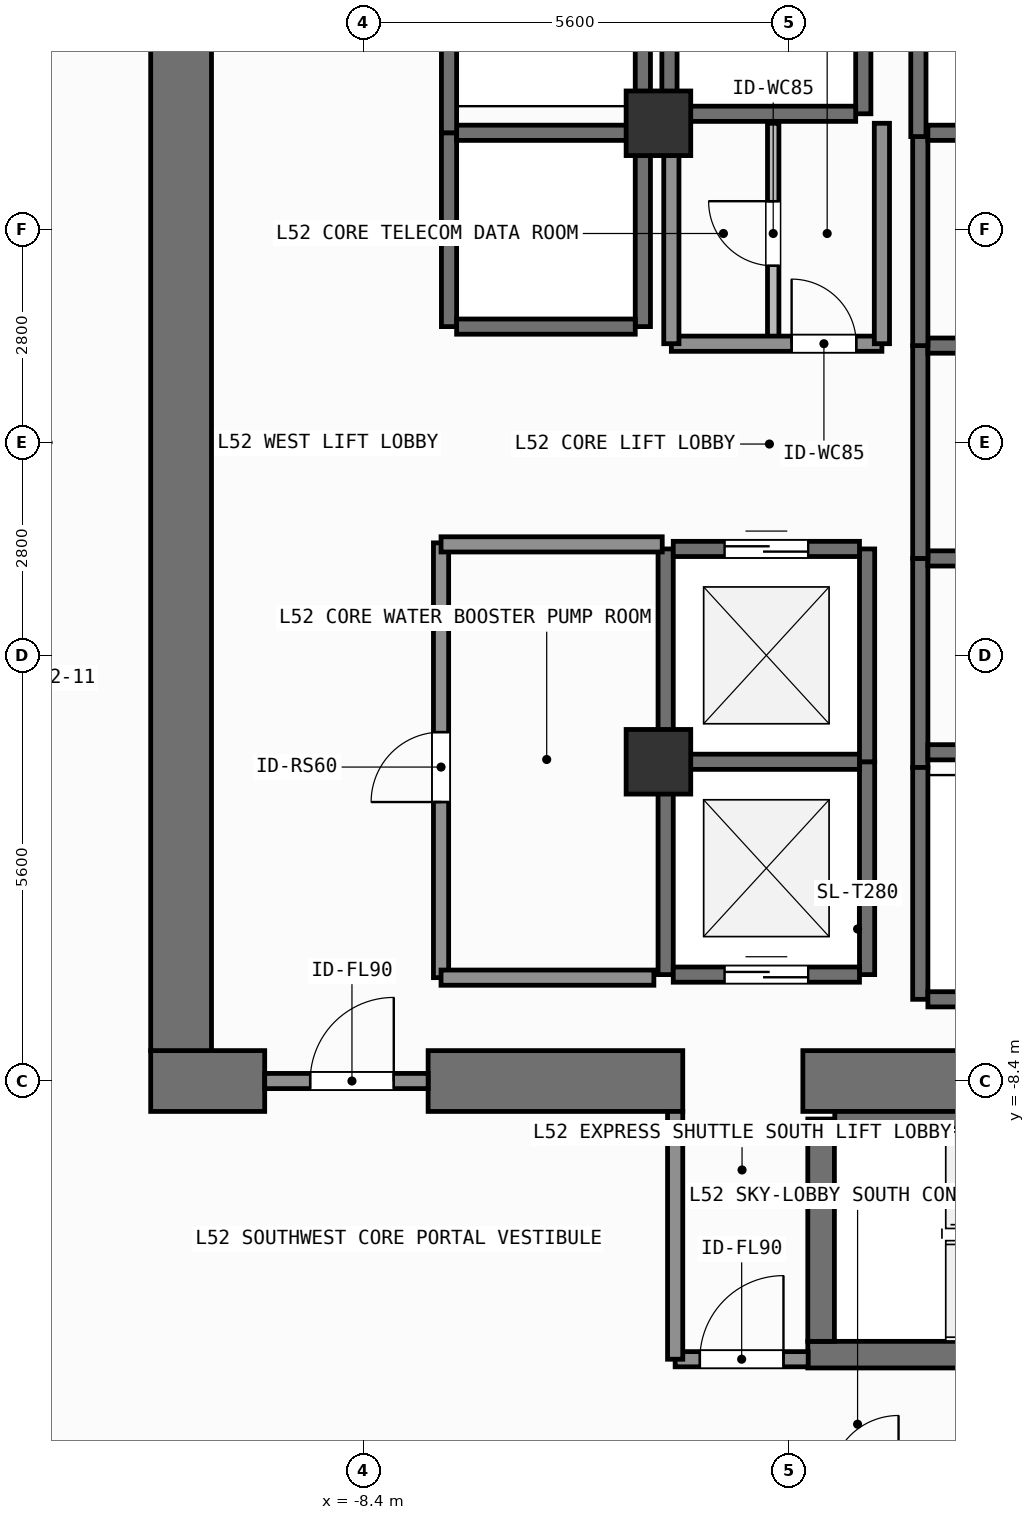
"""IFC4 building model, lengths in metres.
Left out: names, types, materials, properties, quantities, classifications, styles, units other than length and angle.
Written with IfcOpenShell. Run it as: python <this file> out.ifc"""

import sys

from ifc_helpers import new_model, si_unit, direction, frame, frame_2d, origin, origin_2d, place, context, subcontext, project, spatial, rectangle, extrude, element, fill, save


model = new_model("IFC4")
c1 = context("Model", 3, precision=1e-05, world=origin(), true_north=direction((0.0, 1.0)))
c2 = subcontext(c1, "Body", "Model", "MODEL_VIEW")
j1 = project(units=[si_unit("LENGTHUNIT", "METRE"), si_unit("PLANEANGLEUNIT", "RADIAN")], contexts=[c1])
p1 = place(None, origin())
s1 = spatial("IfcSite", under=j1, at=p1, CompositionType="ELEMENT")
p2 = place(p1, origin())
s2 = spatial("IfcBuilding", under=s1, at=p2, CompositionType="ELEMENT")
p3 = place(p2, frame((0.0, 0.0, 210.9)))
s3 = spatial("IfcBuildingStorey", under=s2, at=p3, CompositionType="ELEMENT", Elevation=210.9)
p4 = place(p3, frame((-11.2, -8.4, 0.0), z_axis=(0.0, 0.0, 1.0), x_axis=(1.0, 0.0, 0.0)))
e1 = element("IfcWall", 1, at=p4, inside=s3, PredefinedType="SHEAR", context=c2, shape_type="SweptSolid", body=[
    extrude(rectangle(XDim=1.5, YDim=0.8, at=frame_2d((0.75, 0.0))), origin(), (0.0, 0.0, 1.0), 4.8),
])
p5 = place(p3, frame((-7.55, -8.4, 0.0), z_axis=(0.0, 0.0, 1.0), x_axis=(1.0, 0.0, 0.0)))
e2 = element("IfcWall", 2, at=p5, inside=s3, PredefinedType="SHEAR", context=c2, shape_type="SweptSolid", body=[
    extrude(rectangle(XDim=3.35, YDim=0.8, at=frame_2d((1.675, 0.0))), origin(), (0.0, 0.0, 1.0), 4.8),
])
p6 = place(p3, frame((-2.62, -8.4, 0.0), z_axis=(0.0, 0.0, 1.0), x_axis=(1.0, 0.0, 0.0)))
e3 = element("IfcWall", 3, at=p6, inside=s3, PredefinedType="SHEAR", context=c2, shape_type="SweptSolid", body=[
    extrude(rectangle(XDim=7.27, YDim=0.8, at=frame_2d((3.635, 0.0))), origin(), (0.0, 0.0, 1.0), 4.8),
])
p7 = place(p3, frame((-10.8, -8.0, 0.0), z_axis=(0.0, 0.0, 1.0), x_axis=(0.0, 1.0, 0.0)))
e4 = element("IfcWall", 4, at=p7, inside=s3, PredefinedType="SHEAR", context=c2, shape_type="SweptSolid", body=[
    extrude(rectangle(XDim=16.0, YDim=0.8, at=frame_2d((8.0, 0.0))), origin(), (0.0, 0.0, 1.0), 4.8),
])
p8 = place(p3, frame((-2.555, -12.0, 0.0), z_axis=(0.0, 0.0, 1.0), x_axis=(1.0, 0.0, 0.0)))
e5 = element("IfcWall", 5, at=p8, inside=s3, PredefinedType="SHEAR", context=c2, shape_type="SweptSolid", body=[
    extrude(rectangle(XDim=7.31, YDim=0.35, at=frame_2d((3.655, 0.0))), origin(), (0.0, 0.0, 1.0), 4.8),
])
p9 = place(p3, frame((-2.2, -8.913, 0.0), z_axis=(0.0, 0.0, 1.0), x_axis=(1.0, 0.0, 0.0)))
e6 = element("IfcWall", 6, at=p9, inside=s3, PredefinedType="SHEAR", context=c2, shape_type="SweptSolid", body=[
    extrude(rectangle(XDim=6.6, YDim=0.225, at=frame_2d((3.3, 0.0))), origin(), (0.0, 0.0, 1.0), 4.8),
])
p10 = place(p3, frame((-2.38, -11.825, 0.0), z_axis=(0.0, 0.0, 1.0), x_axis=(0.0, 1.0, 0.0)))
e7 = element("IfcWall", 7, at=p10, inside=s3, PredefinedType="SHEAR", context=c2, shape_type="SweptSolid", body=[
    extrude(rectangle(XDim=2.925, YDim=0.35, at=frame_2d((1.462, 0.0))), origin(), (0.0, 0.0, 1.0), 4.8),
])
for number, where, z_axis, x_axis in (
    (8, (-4.52, -4.2, 0.0), (0.0, 0.0, 1.0), (1.0, 0.0, 0.0)),
    (9, (-4.52, 4.2, 0.0), (0.0, 0.0, 1.0), (1.0, 0.0, 0.0)),
):
    element("IfcColumn", number, at=place(p3, frame(where, z_axis=z_axis, x_axis=x_axis)), inside=s3, PredefinedType="COLUMN", context=c2, shape_type="SweptSolid", body=[
        extrude(rectangle(XDim=0.85, YDim=0.85, at=origin_2d()), origin(), (0.0, 0.0, 1.0), 4.8),
    ])
for number, where, z_axis, x_axis in (
    (10, (-7.275, 1.525, 0.0), (0.0, 0.0, 1.0), (0.0, 1.0, 0.0)),
    (11, (-4.725, 1.525, 0.0), (0.0, 0.0, 1.0), (0.0, 1.0, 0.0)),
):
    element("IfcWall", number, at=place(p3, frame(where, z_axis=z_axis, x_axis=x_axis)), inside=s3, PredefinedType="SHEAR", context=c2, shape_type="SweptSolid", body=[
        extrude(rectangle(XDim=2.55, YDim=0.2, at=frame_2d((1.275, 0.0))), origin(), (0.0, 0.0, 1.0), 4.58),
    ])
for number, where, z_axis, x_axis in (
    (12, (-7.175, 1.525, 0.0), (0.0, 0.0, 1.0), (1.0, 0.0, 0.0)),
    (13, (-7.175, 4.075, 0.0), (0.0, 0.0, 1.0), (1.0, 0.0, 0.0)),
):
    element("IfcWall", number, at=place(p3, frame(where, z_axis=z_axis, x_axis=x_axis)), inside=s3, PredefinedType="SHEAR", context=c2, shape_type="SweptSolid", body=[
        extrude(rectangle(XDim=2.35, YDim=0.2, at=frame_2d((1.175, 0.0))), origin(), (0.0, 0.0, 1.0), 4.58),
    ])
for number, where, z_axis, x_axis in (
    (14, (-7.275, 4.075, 0.0), (0.0, 0.0, 1.0), (0.0, 1.0, 0.0)),
    (15, (-4.725, 4.075, 0.0), (0.0, 0.0, 1.0), (0.0, 1.0, 0.0)),
):
    element("IfcWall", number, at=place(p3, frame(where, z_axis=z_axis, x_axis=x_axis)), inside=s3, PredefinedType="SHEAR", context=c2, shape_type="SweptSolid", body=[
        extrude(rectangle(XDim=2.8, YDim=0.2, at=frame_2d((1.4, 0.0))), origin(), (0.0, 0.0, 1.0), 4.58),
    ])
for number, where, z_axis, x_axis in (
    (16, (-4.375, 4.325, 0.0), (0.0, 0.0, 1.0), (0.0, 1.0, 0.0)),
    (17, (-1.825, 4.325, 0.0), (0.0, 0.0, 1.0), (0.0, 1.0, 0.0)),
):
    element("IfcWall", number, at=place(p3, frame(where, z_axis=z_axis, x_axis=x_axis)), inside=s3, PredefinedType="SHEAR", context=c2, shape_type="SweptSolid", body=[
        extrude(rectangle(XDim=2.55, YDim=0.2, at=frame_2d((1.275, 0.0))), origin(), (0.0, 0.0, 1.0), 4.58),
    ])
p11 = place(p3, frame((-4.275, 4.325, 0.0), z_axis=(0.0, 0.0, 1.0), x_axis=(1.0, 0.0, 0.0)))
e18 = element("IfcWall", 18, at=p11, inside=s3, PredefinedType="SHEAR", context=c2, shape_type="SweptSolid", body=[
    extrude(rectangle(XDim=2.35, YDim=0.2, at=frame_2d((1.175, 0.0))), origin(), (0.0, 0.0, 1.0), 4.58),
])
for number, where, z_axis, x_axis in (
    (19, (-4.425, -7.0, 0.0), (0.0, 0.0, 1.0), (0.0, 1.0, 0.0)),
    (20, (-1.775, -7.0, 0.0), (0.0, 0.0, 1.0), (0.0, 1.0, 0.0)),
):
    element("IfcWall", number, at=place(p3, frame(where, z_axis=z_axis, x_axis=x_axis)), inside=s3, PredefinedType="SHEAR", context=c2, shape_type="SweptSolid", body=[
        extrude(rectangle(XDim=2.8, YDim=0.2, at=frame_2d((1.4, 0.0))), origin(), (0.0, 0.0, 1.0), 4.58),
    ])
p12 = place(p3, frame((-4.325, -7.0, 0.0), z_axis=(0.0, 0.0, 1.0), x_axis=(1.0, 0.0, 0.0)))
e21 = element("IfcWall", 21, at=p12, inside=s3, PredefinedType="SHEAR", context=c2, shape_type="SweptSolid", body=[
    extrude(rectangle(XDim=2.45, YDim=0.2, at=frame_2d((1.225, 0.0))), origin(), (0.0, 0.0, 1.0), 4.58),
])
p13 = place(p12, frame((0.675, 0.0, 0.0)))
e22 = element("IfcOpeningElement", 22, at=p13, cuts=e21, PredefinedType="OPENING", context=c2, shape_type="SweptSolid", body=[
    extrude(rectangle(XDim=1.1, YDim=2.2, at=frame_2d((0.55, 1.1))), frame((0.0, 0.11, 0.0), z_axis=(0.0, -1.0, 0.0), x_axis=(1.0, 0.0, 0.0)), (0.0, 0.0, 1.0), 0.22),
])
p14 = place(p3, frame((-4.325, -4.2, 0.0), z_axis=(0.0, 0.0, 1.0), x_axis=(1.0, 0.0, 0.0)))
e23 = element("IfcWall", 23, at=p14, inside=s3, PredefinedType="SHEAR", context=c2, shape_type="SweptSolid", body=[
    extrude(rectangle(XDim=2.45, YDim=0.2, at=frame_2d((1.225, 0.0))), origin(), (0.0, 0.0, 1.0), 4.58),
])
for number, where, z_axis, x_axis in (
    (24, (-4.425, -4.2, 0.0), (0.0, 0.0, 1.0), (0.0, 1.0, 0.0)),
    (25, (-1.775, -4.2, 0.0), (0.0, 0.0, 1.0), (0.0, 1.0, 0.0)),
):
    element("IfcWall", number, at=place(p3, frame(where, z_axis=z_axis, x_axis=x_axis)), inside=s3, PredefinedType="SHEAR", context=c2, shape_type="SweptSolid", body=[
        extrude(rectangle(XDim=2.8, YDim=0.2, at=frame_2d((1.4, 0.0))), origin(), (0.0, 0.0, 1.0), 4.58),
    ])
p15 = place(p3, frame((-4.325, -1.4, 0.0), z_axis=(0.0, 0.0, 1.0), x_axis=(1.0, 0.0, 0.0)))
e26 = element("IfcWall", 26, at=p15, inside=s3, PredefinedType="SHEAR", context=c2, shape_type="SweptSolid", body=[
    extrude(rectangle(XDim=2.45, YDim=0.2, at=frame_2d((1.225, 0.0))), origin(), (0.0, 0.0, 1.0), 4.58),
])
p16 = place(p15, frame((0.675, 0.0, 0.0)))
e27 = element("IfcOpeningElement", 27, at=p16, cuts=e26, PredefinedType="OPENING", context=c2, shape_type="SweptSolid", body=[
    extrude(rectangle(XDim=1.1, YDim=2.2, at=frame_2d((0.55, 1.1))), frame((0.0, 0.11, 0.0), z_axis=(0.0, -1.0, 0.0), x_axis=(1.0, 0.0, 0.0)), (0.0, 0.0, 1.0), 0.22),
])
p17 = place(p3, frame((-1.075, -4.275, 0.0), z_axis=(0.0, 0.0, 1.0), x_axis=(0.0, 1.0, 0.0)))
e28 = element("IfcWall", 28, at=p17, inside=s3, PredefinedType="SHEAR", context=c2, shape_type="SweptSolid", body=[
    extrude(rectangle(XDim=2.75, YDim=0.2, at=frame_2d((1.375, 0.0))), origin(), (0.0, 0.0, 1.0), 4.58),
])
for number, where, z_axis, x_axis in (
    (29, (-0.975, -4.075, 0.0), (0.0, 0.0, 1.0), (1.0, 0.0, 0.0)),
    (30, (-0.975, -1.525, 0.0), (0.0, 0.0, 1.0), (1.0, 0.0, 0.0)),
):
    element("IfcWall", number, at=place(p3, frame(where, z_axis=z_axis, x_axis=x_axis)), inside=s3, PredefinedType="SHEAR", context=c2, shape_type="SweptSolid", body=[
        extrude(rectangle(XDim=2.35, YDim=0.2, at=frame_2d((1.175, 0.0))), origin(), (0.0, 0.0, 1.0), 4.58),
    ])
p18 = place(p3, frame((-1.075, -1.525, 0.0), z_axis=(0.0, 0.0, 1.0), x_axis=(0.0, 1.0, 0.0)))
e31 = element("IfcWall", 31, at=p18, inside=s3, PredefinedType="SHEAR", context=c2, shape_type="SweptSolid", body=[
    extrude(rectangle(XDim=2.8, YDim=0.2, at=frame_2d((1.4, 0.0))), origin(), (0.0, 0.0, 1.0), 4.58),
])
p19 = place(p3, frame((-0.975, 1.275, 0.0), z_axis=(0.0, 0.0, 1.0), x_axis=(1.0, 0.0, 0.0)))
e32 = element("IfcWall", 32, at=p19, inside=s3, PredefinedType="SHEAR", context=c2, shape_type="SweptSolid", body=[
    extrude(rectangle(XDim=2.35, YDim=0.2, at=frame_2d((1.175, 0.0))), origin(), (0.0, 0.0, 1.0), 4.58),
])
p20 = place(p3, frame((-1.075, 1.275, 0.0), z_axis=(0.0, 0.0, 1.0), x_axis=(0.0, 1.0, 0.0)))
e33 = element("IfcWall", 33, at=p20, inside=s3, PredefinedType="SHEAR", context=c2, shape_type="SweptSolid", body=[
    extrude(rectangle(XDim=2.8, YDim=0.2, at=frame_2d((1.4, 0.0))), origin(), (0.0, 0.0, 1.0), 4.58),
])
p21 = place(p3, frame((-0.975, 4.075, 0.0), z_axis=(0.0, 0.0, 1.0), x_axis=(1.0, 0.0, 0.0)))
e34 = element("IfcWall", 34, at=p21, inside=s3, PredefinedType="SHEAR", context=c2, shape_type="SweptSolid", body=[
    extrude(rectangle(XDim=2.35, YDim=0.2, at=frame_2d((1.175, 0.0))), origin(), (0.0, 0.0, 1.0), 4.58),
])
p22 = place(p3, frame((-1.1, 4.025, 0.0), z_axis=(0.0, 0.0, 1.0), x_axis=(0.0, 1.0, 0.0)))
e35 = element("IfcWall", 35, at=p22, inside=s3, PredefinedType="SHEAR", context=c2, shape_type="SweptSolid", body=[
    extrude(rectangle(XDim=3.15, YDim=0.2, at=frame_2d((1.575, 0.0))), origin(), (0.0, 0.0, 1.0), 4.58),
])
p23 = place(p3, frame((-1.075, -7.325, 0.0), z_axis=(0.0, 0.0, 1.0), x_axis=(0.0, 1.0, 0.0)))
e36 = element("IfcWall", 36, at=p23, inside=s3, PredefinedType="SHEAR", context=c2, shape_type="SweptSolid", body=[
    extrude(rectangle(XDim=3.05, YDim=0.2, at=frame_2d((1.525, 0.0))), origin(), (0.0, 0.0, 1.0), 4.58),
])
p24 = place(p3, frame((-0.975, -7.325, 0.0), z_axis=(0.0, 0.0, 1.0), x_axis=(1.0, 0.0, 0.0)))
e37 = element("IfcWall", 37, at=p24, inside=s3, PredefinedType="SHEAR", context=c2, shape_type="SweptSolid", body=[
    extrude(rectangle(XDim=2.35, YDim=0.2, at=frame_2d((1.175, 0.0))), origin(), (0.0, 0.0, 1.0), 4.58),
])
p25 = place(p3, frame((-9.7, -8.4, 0.0), z_axis=(0.0, 0.0, 1.0), x_axis=(1.0, 0.0, 0.0)))
e38 = element("IfcWall", 38, at=p25, inside=s3, PredefinedType="SOLIDWALL", context=c2, shape_type="SweptSolid", body=[
    extrude(rectangle(XDim=2.15, YDim=0.2, at=frame_2d((1.075, 0.0))), origin(), (0.0, 0.0, 1.0), 3.72),
])
p26 = place(p25, frame((0.598, 0.0, 0.0)))
e39 = element("IfcOpeningElement", 39, at=p26, cuts=e38, PredefinedType="OPENING", context=c2, shape_type="SweptSolid", body=[
    extrude(rectangle(XDim=1.1, YDim=2.15, at=frame_2d((0.55, 1.075))), frame((0.0, 0.11, 0.0), z_axis=(0.0, -1.0, 0.0), x_axis=(1.0, 0.0, 0.0)), (0.0, 0.0, 1.0), 0.22),
])
p27 = place(p3, frame((-4.3, -12.06, 0.0), z_axis=(0.0, 0.0, 1.0), x_axis=(1.0, 0.0, 0.0)))
e40 = element("IfcWall", 40, at=p27, inside=s3, PredefinedType="SOLIDWALL", context=c2, shape_type="SweptSolid", body=[
    extrude(rectangle(XDim=1.75, YDim=0.2, at=frame_2d((0.875, 0.0))), origin(), (0.0, 0.0, 1.0), 4.58),
])
p28 = place(p27, frame((0.325, 0.0, 0.0)))
e41 = element("IfcOpeningElement", 41, at=p28, cuts=e40, PredefinedType="OPENING", context=c2, shape_type="SweptSolid", body=[
    extrude(rectangle(XDim=1.1, YDim=2.15, at=frame_2d((0.55, 1.075))), frame((0.0, 0.11, 0.0), z_axis=(0.0, -1.0, 0.0), x_axis=(1.0, 0.0, 0.0)), (0.0, 0.0, 1.0), 0.22),
])
p29 = place(p3, frame((-7.38, -7.04, 0.0), z_axis=(0.0, 0.0, 1.0), x_axis=(0.0, 1.0, 0.0)))
e42 = element("IfcWall", 42, at=p29, inside=s3, PredefinedType="SOLIDWALL", context=c2, shape_type="SweptSolid", body=[
    extrude(rectangle(XDim=5.72, YDim=0.2, at=frame_2d((2.86, 0.0))), origin(), (0.0, 0.0, 1.0), 4.58),
])
p30 = place(p29, frame((2.31, 0.0, 0.0)))
e43 = element("IfcOpeningElement", 43, at=p30, cuts=e42, PredefinedType="OPENING", context=c2, shape_type="SweptSolid", body=[
    extrude(rectangle(XDim=0.92, YDim=2.1, at=frame_2d((0.46, 1.05))), frame((0.0, 0.11, 0.0), z_axis=(0.0, -1.0, 0.0), x_axis=(1.0, 0.0, 0.0)), (0.0, 0.0, 1.0), 0.22),
])
p31 = place(p3, frame((-3.01, 1.3, 0.0), z_axis=(0.0, 0.0, 1.0), x_axis=(0.0, 1.0, 0.0)))
e44 = element("IfcWall", 44, at=p31, inside=s3, PredefinedType="PARTITIONING", context=c2, shape_type="SweptSolid", body=[
    extrude(rectangle(XDim=2.9, YDim=0.15, at=frame_2d((1.45, 0.0))), origin(), (0.0, 0.0, 1.0), 4.58),
])
p32 = place(p31, frame((1.025, 0.0, 0.0)))
e45 = element("IfcOpeningElement", 45, at=p32, cuts=e44, PredefinedType="OPENING", context=c2, shape_type="SweptSolid", body=[
    extrude(rectangle(XDim=0.85, YDim=2.1, at=frame_2d((0.425, 1.05))), frame((0.0, 0.085, 0.0), z_axis=(0.0, -1.0, 0.0), x_axis=(1.0, 0.0, 0.0)), (0.0, 0.0, 1.0), 0.17),
])
p33 = place(p3, frame((-4.35, 1.3, 0.0), z_axis=(0.0, 0.0, 1.0), x_axis=(1.0, 0.0, 0.0)))
e46 = element("IfcWall", 46, at=p33, inside=s3, PredefinedType="SOLIDWALL", context=c2, shape_type="SweptSolid", body=[
    extrude(rectangle(XDim=2.77, YDim=0.2, at=frame_2d((1.385, 0.0))), origin(), (0.0, 0.0, 1.0), 4.58),
])
p34 = place(p33, frame((1.582, 0.0, 0.0)))
e47 = element("IfcOpeningElement", 47, at=p34, cuts=e46, PredefinedType="OPENING", context=c2, shape_type="SweptSolid", body=[
    extrude(rectangle(XDim=0.85, YDim=2.1, at=frame_2d((0.425, 1.05))), frame((0.0, 0.11, 0.0), z_axis=(0.0, -1.0, 0.0), x_axis=(1.0, 0.0, 0.0)), (0.0, 0.0, 1.0), 0.22),
])
p35 = place(p3, frame((-4.3, -12.06, 0.0), z_axis=(0.0, 0.0, 1.0), x_axis=(0.0, 1.0, 0.0)))
e48 = element("IfcWall", 48, at=p35, inside=s3, PredefinedType="SOLIDWALL", context=c2, shape_type="SweptSolid", body=[
    extrude(rectangle(XDim=3.26, YDim=0.2, at=frame_2d((1.63, 0.0))), origin(), (0.0, 0.0, 1.0), 4.58),
])
p36 = place(p3, frame((-7.38, -1.34, 0.0), z_axis=(0.0, 0.0, 1.0), x_axis=(1.0, 0.0, 0.0)))
e49 = element("IfcWall", 49, at=p36, inside=s3, PredefinedType="SOLIDWALL", context=c2, shape_type="SweptSolid", body=[
    extrude(rectangle(XDim=2.91, YDim=0.2, at=frame_2d((1.455, 0.0))), origin(), (0.0, 0.0, 1.0), 4.58),
])
p37 = place(p3, frame((-7.38, -7.04, 0.0), z_axis=(0.0, 0.0, 1.0), x_axis=(1.0, 0.0, 0.0)))
e50 = element("IfcWall", 50, at=p37, inside=s3, PredefinedType="SOLIDWALL", context=c2, shape_type="SweptSolid", body=[
    extrude(rectangle(XDim=2.8, YDim=0.2, at=frame_2d((1.4, 0.0))), origin(), (0.0, 0.0, 1.0), 4.58),
])
for number, where, z_axis, x_axis in (
    (51, (-4.35, 1.3, 0.0), (0.0, 0.0, 1.0), (0.0, 1.0, 0.0)),
    (52, (-1.58, 1.3, 0.0), (0.0, 0.0, 1.0), (0.0, 1.0, 0.0)),
):
    element("IfcWall", number, at=place(p3, frame(where, z_axis=z_axis, x_axis=x_axis)), inside=s3, PredefinedType="SOLIDWALL", context=c2, shape_type="SweptSolid", body=[
        extrude(rectangle(XDim=2.9, YDim=0.2, at=frame_2d((1.45, 0.0))), origin(), (0.0, 0.0, 1.0), 4.58),
    ])
p38 = place(p13, origin())
e53 = element("IfcDoor", 53, at=p38, inside=s3, OperationType="SLIDING_TO_LEFT", PredefinedType="DOOR", context=c2, shape_type="SweptSolid", body=[
    extrude(rectangle(XDim=1.1, YDim=2.2, at=frame_2d((0.55, 1.1))), frame((0.0, 0.025, 0.0), z_axis=(0.0, -1.0, 0.0), x_axis=(1.0, 0.0, 0.0)), (0.0, 0.0, 1.0), 0.05),
])
fill(e22, e53)
p39 = place(p16, origin())
e54 = element("IfcDoor", 54, at=p39, inside=s3, OperationType="SLIDING_TO_LEFT", PredefinedType="DOOR", context=c2, shape_type="SweptSolid", body=[
    extrude(rectangle(XDim=1.1, YDim=2.2, at=frame_2d((0.55, 1.1))), frame((0.0, 0.025, 0.0), z_axis=(0.0, -1.0, 0.0), x_axis=(1.0, 0.0, 0.0)), (0.0, 0.0, 1.0), 0.05),
])
fill(e27, e54)
p40 = place(p26, origin())
e55 = element("IfcDoor", 55, at=p40, inside=s3, OperationType="SINGLE_SWING_RIGHT", PredefinedType="DOOR", context=c2, shape_type="SweptSolid", body=[
    extrude(rectangle(XDim=1.1, YDim=2.15, at=frame_2d((0.55, 1.075))), frame((0.0, 0.025, 0.0), z_axis=(0.0, -1.0, 0.0), x_axis=(1.0, 0.0, 0.0)), (0.0, 0.0, 1.0), 0.05),
])
fill(e39, e55)
p41 = place(p28, origin())
e56 = element("IfcDoor", 56, at=p41, inside=s3, OperationType="SINGLE_SWING_RIGHT", PredefinedType="DOOR", context=c2, shape_type="SweptSolid", body=[
    extrude(rectangle(XDim=1.1, YDim=2.15, at=frame_2d((0.55, 1.075))), frame((0.0, 0.025, 0.0), z_axis=(0.0, -1.0, 0.0), x_axis=(1.0, 0.0, 0.0)), (0.0, 0.0, 1.0), 0.05),
])
fill(e41, e56)
p42 = place(p30, origin())
e57 = element("IfcDoor", 57, at=p42, inside=s3, OperationType="SINGLE_SWING_LEFT", PredefinedType="DOOR", context=c2, shape_type="SweptSolid", body=[
    extrude(rectangle(XDim=0.92, YDim=2.1, at=frame_2d((0.46, 1.05))), frame((0.0, 0.025, 0.0), z_axis=(0.0, -1.0, 0.0), x_axis=(1.0, 0.0, 0.0)), (0.0, 0.0, 1.0), 0.05),
])
fill(e43, e57)
p43 = place(p32, origin())
e58 = element("IfcDoor", 58, at=p43, inside=s3, OperationType="SINGLE_SWING_RIGHT", PredefinedType="DOOR", context=c2, shape_type="SweptSolid", body=[
    extrude(rectangle(XDim=0.85, YDim=2.1, at=frame_2d((0.425, 1.05))), frame((0.0, 0.025, 0.0), z_axis=(0.0, -1.0, 0.0), x_axis=(1.0, 0.0, 0.0)), (0.0, 0.0, 1.0), 0.05),
])
fill(e45, e58)
p44 = place(p34, origin())
e59 = element("IfcDoor", 59, at=p44, inside=s3, OperationType="SINGLE_SWING_LEFT", PredefinedType="DOOR", context=c2, shape_type="SweptSolid", body=[
    extrude(rectangle(XDim=0.85, YDim=2.1, at=frame_2d((0.425, 1.05))), frame((0.0, 0.025, 0.0), z_axis=(0.0, -1.0, 0.0), x_axis=(1.0, 0.0, 0.0)), (0.0, 0.0, 1.0), 0.05),
])
fill(e47, e59)
save(model, sys.argv[1])
